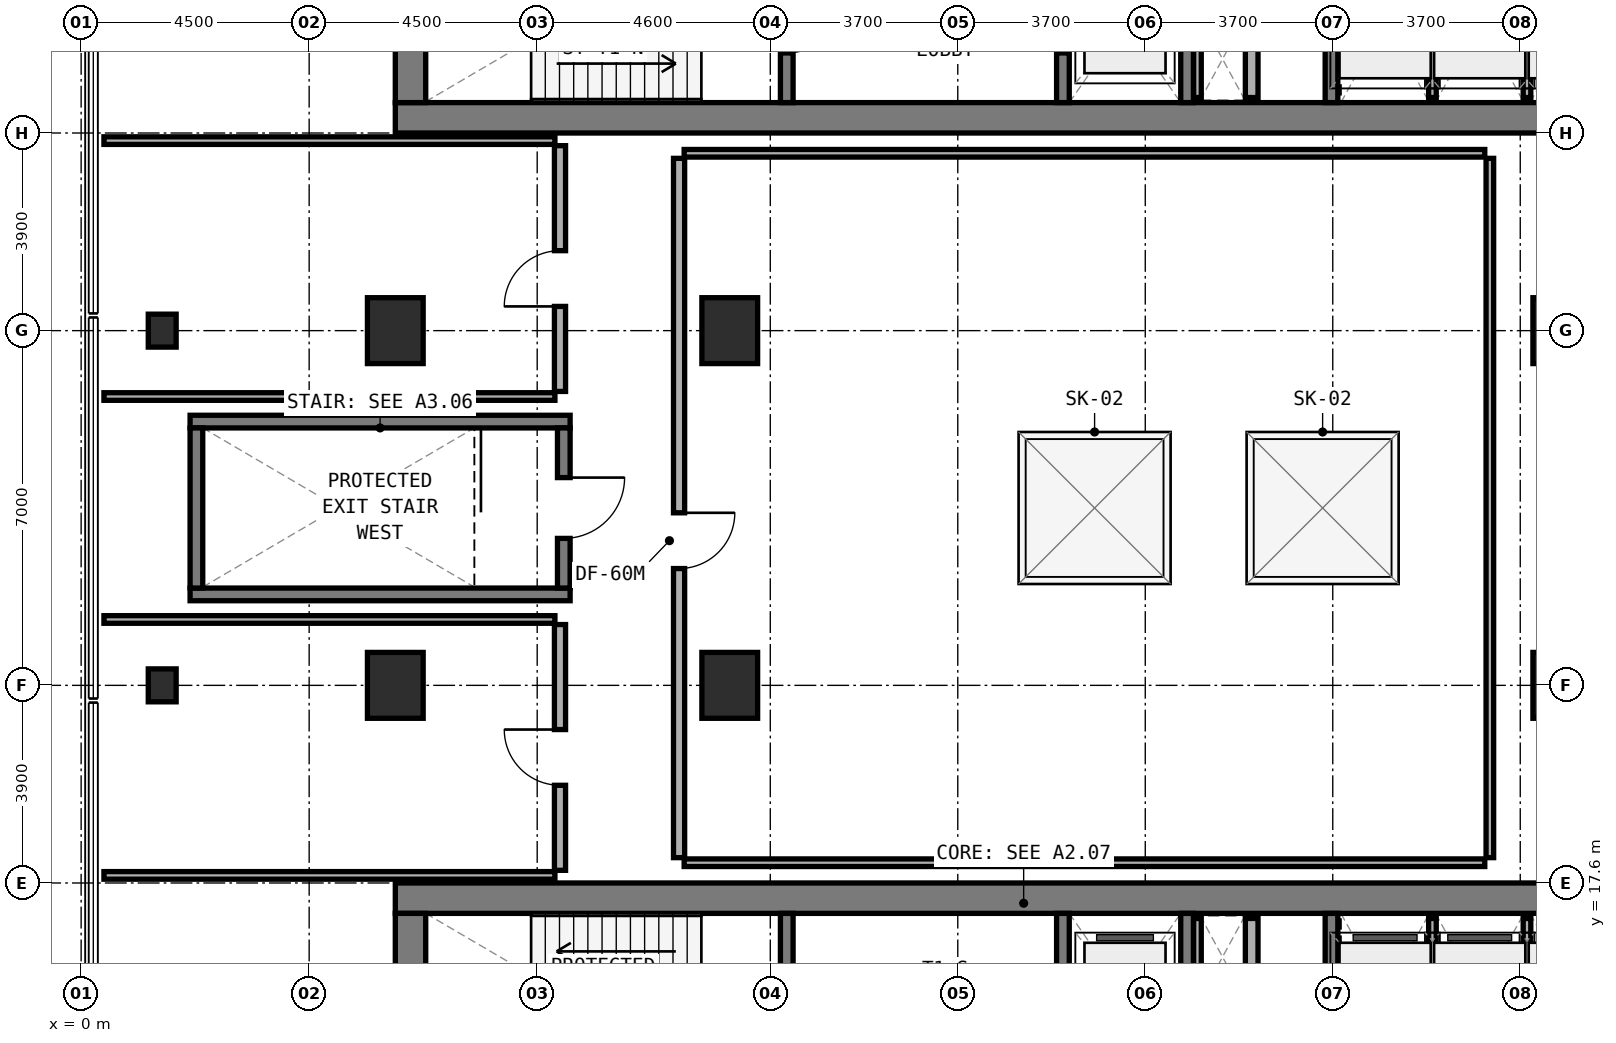
"""IFC4 building model, lengths in metres.
Left out: names, types, materials, properties, quantities, classifications, styles, units other than length and angle.
Written with IfcOpenShell. Run it as: python <this file> out.ifc"""

import sys

from ifc_helpers import new_model, si_unit, direction, frame, frame_2d, origin, origin_2d, place, context, subcontext, project, spatial, rectangle, extrude, element, fill, save


model = new_model("IFC4")
c1 = context("Model", 3, precision=1e-05, world=origin(), true_north=direction((0.0, 1.0)))
c2 = subcontext(c1, "Body", "Model", "MODEL_VIEW")
j1 = project(units=[si_unit("LENGTHUNIT", "METRE"), si_unit("PLANEANGLEUNIT", "RADIAN")], contexts=[c1])
p1 = place(None, origin())
s1 = spatial("IfcSite", under=j1, at=p1, CompositionType="ELEMENT")
p2 = place(p1, origin())
s2 = spatial("IfcBuilding", under=s1, at=p2, CompositionType="ELEMENT")
p3 = place(p2, frame((0.0, 0.0, 19.5)))
s3 = spatial("IfcBuildingStorey", under=s2, at=p3, CompositionType="ELEMENT", Elevation=19.5)
p4 = place(p3, frame((6.2, 32.7, 0.0), z_axis=(0.0, 0.0, 1.0), x_axis=(1.0, 0.0, 0.0)))
e1 = element("IfcWall", 1, at=p4, inside=s3, PredefinedType="SHEAR", context=c2, shape_type="SweptSolid", body=[
    extrude(rectangle(XDim=24.8, YDim=0.6, at=frame_2d((12.4, 0.0))), origin(), (0.0, 0.0, 1.0), 4.5),
])
p5 = place(p3, frame((6.5, 33.0, 0.0), z_axis=(0.0, 0.0, 1.0), x_axis=(0.0, 1.0, 0.0)))
e2 = element("IfcWall", 2, at=p5, inside=s3, PredefinedType="SHEAR", context=c2, shape_type="SweptSolid", body=[
    extrude(rectangle(XDim=3.16, YDim=0.6, at=frame_2d((1.58, 0.0))), origin(), (0.0, 0.0, 1.0), 4.5),
])
p6 = place(p3, frame((13.925, 33.0, 0.0), z_axis=(0.0, 0.0, 1.0), x_axis=(0.0, 1.0, 0.0)))
e3 = element("IfcWall", 3, at=p6, inside=s3, PredefinedType="STANDARD", context=c2, shape_type="SweptSolid", body=[
    extrude(rectangle(XDim=3.16, YDim=0.25, at=frame_2d((1.58, 0.0))), origin(), (0.0, 0.0, 1.0), 4.22),
])
p7 = place(p6, frame((0.98, 0.0, 0.0)))
e4 = element("IfcOpeningElement", 4, at=p7, cuts=e3, PredefinedType="OPENING", context=c2, shape_type="SweptSolid", body=[
    extrude(rectangle(XDim=1.1, YDim=2.15, at=frame_2d((0.55, 1.075))), frame((0.0, 0.135, 0.0), z_axis=(0.0, -1.0, 0.0), x_axis=(1.0, 0.0, 0.0)), (0.0, 0.0, 1.0), 0.27),
])
p8 = place(p3, frame((19.375, 33.0, 0.0), z_axis=(0.0, 0.0, 1.0), x_axis=(0.0, 1.0, 0.0)))
e5 = element("IfcWall", 5, at=p8, inside=s3, PredefinedType="STANDARD", context=c2, shape_type="SweptSolid", body=[
    extrude(rectangle(XDim=3.16, YDim=0.25, at=frame_2d((1.58, 0.0))), origin(), (0.0, 0.0, 1.0), 4.22),
])
p9 = place(p8, frame((0.98, 0.0, 0.0)))
e6 = element("IfcOpeningElement", 6, at=p9, cuts=e5, PredefinedType="OPENING", context=c2, shape_type="SweptSolid", body=[
    extrude(rectangle(XDim=1.1, YDim=2.15, at=frame_2d((0.55, 1.075))), frame((0.0, 0.135, 0.0), z_axis=(0.0, -1.0, 0.0), x_axis=(1.0, 0.0, 0.0)), (0.0, 0.0, 1.0), 0.27),
])
for number, where, z_axis, x_axis in (
    (7, (21.825, 33.0, 0.0), (0.0, 0.0, 1.0), (0.0, 1.0, 0.0)),
    (8, (24.675, 33.0, 0.0), (0.0, 0.0, 1.0), (0.0, 1.0, 0.0)),
):
    element("IfcWall", number, at=place(p3, frame(where, z_axis=z_axis, x_axis=x_axis)), inside=s3, PredefinedType="STANDARD", context=c2, shape_type="SweptSolid", body=[
        extrude(rectangle(XDim=3.16, YDim=0.25, at=frame_2d((1.58, 0.0))), origin(), (0.0, 0.0, 1.0), 4.22),
    ])
p10 = place(p3, frame((6.2, 17.3, 0.0), z_axis=(0.0, 0.0, 1.0), x_axis=(1.0, 0.0, 0.0)))
e9 = element("IfcWall", 9, at=p10, inside=s3, PredefinedType="SHEAR", context=c2, shape_type="SweptSolid", body=[
    extrude(rectangle(XDim=24.8, YDim=0.6, at=frame_2d((12.4, 0.0))), origin(), (0.0, 0.0, 1.0), 4.5),
])
p11 = place(p3, frame((6.5, 13.84, 0.0), z_axis=(0.0, 0.0, 1.0), x_axis=(0.0, 1.0, 0.0)))
e10 = element("IfcWall", 10, at=p11, inside=s3, PredefinedType="SHEAR", context=c2, shape_type="SweptSolid", body=[
    extrude(rectangle(XDim=3.16, YDim=0.6, at=frame_2d((1.58, 0.0))), origin(), (0.0, 0.0, 1.0), 4.5),
])
p12 = place(p3, frame((13.925, 13.84, 0.0), z_axis=(0.0, 0.0, 1.0), x_axis=(0.0, 1.0, 0.0)))
e11 = element("IfcWall", 11, at=p12, inside=s3, PredefinedType="STANDARD", context=c2, shape_type="SweptSolid", body=[
    extrude(rectangle(XDim=3.16, YDim=0.25, at=frame_2d((1.58, 0.0))), origin(), (0.0, 0.0, 1.0), 4.22),
])
p13 = place(p12, frame((0.98, 0.0, 0.0)))
e12 = element("IfcOpeningElement", 12, at=p13, cuts=e11, PredefinedType="OPENING", context=c2, shape_type="SweptSolid", body=[
    extrude(rectangle(XDim=1.1, YDim=2.15, at=frame_2d((0.55, 1.075))), frame((0.0, 0.135, 0.0), z_axis=(0.0, -1.0, 0.0), x_axis=(1.0, 0.0, 0.0)), (0.0, 0.0, 1.0), 0.27),
])
p14 = place(p3, frame((19.375, 13.84, 0.0), z_axis=(0.0, 0.0, 1.0), x_axis=(0.0, 1.0, 0.0)))
e13 = element("IfcWall", 13, at=p14, inside=s3, PredefinedType="STANDARD", context=c2, shape_type="SweptSolid", body=[
    extrude(rectangle(XDim=3.16, YDim=0.25, at=frame_2d((1.58, 0.0))), origin(), (0.0, 0.0, 1.0), 4.22),
])
p15 = place(p14, frame((0.98, 0.0, 0.0)))
e14 = element("IfcOpeningElement", 14, at=p15, cuts=e13, PredefinedType="OPENING", context=c2, shape_type="SweptSolid", body=[
    extrude(rectangle(XDim=1.1, YDim=2.15, at=frame_2d((0.55, 1.075))), frame((0.0, 0.135, 0.0), z_axis=(0.0, -1.0, 0.0), x_axis=(1.0, 0.0, 0.0)), (0.0, 0.0, 1.0), 0.27),
])
for number, where, z_axis, x_axis in (
    (15, (21.825, 13.84, 0.0), (0.0, 0.0, 1.0), (0.0, 1.0, 0.0)),
    (16, (24.675, 13.84, 0.0), (0.0, 0.0, 1.0), (0.0, 1.0, 0.0)),
):
    element("IfcWall", number, at=place(p3, frame(where, z_axis=z_axis, x_axis=x_axis)), inside=s3, PredefinedType="STANDARD", context=c2, shape_type="SweptSolid", body=[
        extrude(rectangle(XDim=3.16, YDim=0.25, at=frame_2d((1.58, 0.0))), origin(), (0.0, 0.0, 1.0), 4.22),
    ])
for number, where, z_axis, x_axis in (
    (17, (2.15, 23.295, 0.0), (0.0, 0.0, 1.0), (1.0, 0.0, 0.0)),
    (18, (2.15, 26.705, 0.0), (0.0, 0.0, 1.0), (1.0, 0.0, 0.0)),
):
    element("IfcWall", number, at=place(p3, frame(where, z_axis=z_axis, x_axis=x_axis)), inside=s3, PredefinedType="STANDARD", context=c2, shape_type="SweptSolid", body=[
        extrude(rectangle(XDim=7.5, YDim=0.25, at=frame_2d((3.75, 0.0))), origin(), (0.0, 0.0, 1.0), 4.5),
    ])
p16 = place(p3, frame((2.275, 23.42, 0.0), z_axis=(0.0, 0.0, 1.0), x_axis=(0.0, 1.0, 0.0)))
e19 = element("IfcWall", 19, at=p16, inside=s3, PredefinedType="STANDARD", context=c2, shape_type="SweptSolid", body=[
    extrude(rectangle(XDim=3.16, YDim=0.25, at=frame_2d((1.58, 0.0))), origin(), (0.0, 0.0, 1.0), 4.5),
])
p17 = place(p3, frame((9.525, 23.42, 0.0), z_axis=(0.0, 0.0, 1.0), x_axis=(0.0, 1.0, 0.0)))
e20 = element("IfcWall", 20, at=p17, inside=s3, PredefinedType="STANDARD", context=c2, shape_type="SweptSolid", body=[
    extrude(rectangle(XDim=3.16, YDim=0.25, at=frame_2d((1.58, 0.0))), origin(), (0.0, 0.0, 1.0), 4.5),
])
p18 = place(p17, frame((0.98, 0.0, 0.0)))
e21 = element("IfcOpeningElement", 21, at=p18, cuts=e20, PredefinedType="OPENING", context=c2, shape_type="SweptSolid", body=[
    extrude(rectangle(XDim=1.2, YDim=2.15, at=frame_2d((0.6, 1.075))), frame((0.0, 0.135, 0.0), z_axis=(0.0, -1.0, 0.0), x_axis=(1.0, 0.0, 0.0)), (0.0, 0.0, 1.0), 0.27),
])
for number, where, z_axis, x_axis in (
    (22, (6.2, 21.5, 0.0), (0.0, 0.0, 1.0), (1.0, 0.0, 0.0)),
    (23, (6.2, 28.5, 0.0), (0.0, 0.0, 1.0), (1.0, 0.0, 0.0)),
    (24, (12.8, 21.5, 0.0), (0.0, 0.0, 1.0), (1.0, 0.0, 0.0)),
    (25, (12.8, 28.5, 0.0), (0.0, 0.0, 1.0), (1.0, 0.0, 0.0)),
    (26, (29.2, 21.5, 0.0), (0.0, 0.0, 1.0), (1.0, 0.0, 0.0)),
    (27, (29.2, 28.5, 0.0), (0.0, 0.0, 1.0), (1.0, 0.0, 0.0)),
):
    element("IfcColumn", number, at=place(p3, frame(where, z_axis=z_axis, x_axis=x_axis)), inside=s3, PredefinedType="COLUMN", context=c2, shape_type="SweptSolid", body=[
        extrude(rectangle(XDim=1.1, YDim=1.3, at=origin_2d()), origin(), (0.0, 0.0, 1.0), 4.5),
    ])
for number, where, z_axis, x_axis in (
    (28, (1.6, 21.5, 0.0), (0.0, 0.0, 1.0), (1.0, 0.0, 0.0)),
    (29, (1.6, 28.5, 0.0), (0.0, 0.0, 1.0), (1.0, 0.0, 0.0)),
):
    element("IfcColumn", number, at=place(p3, frame(where, z_axis=z_axis, x_axis=x_axis)), inside=s3, PredefinedType="PILASTER", context=c2, shape_type="SweptSolid", body=[
        extrude(rectangle(XDim=0.55, YDim=0.65, at=origin_2d()), origin(), (0.0, 0.0, 1.0), 4.5),
    ])
p19 = place(p3, frame((22.03, 33.1, 0.0), z_axis=(0.0, 0.0, 1.0), x_axis=(0.0, 1.0, 0.0)))
e30 = element("IfcWall", 30, at=p19, inside=s3, PredefinedType="PARTITIONING", context=c2, shape_type="SweptSolid", body=[
    extrude(rectangle(XDim=1.62, YDim=0.15, at=frame_2d((0.81, 0.0))), origin(), (0.0, 0.0, 1.0), 4.22),
])
p20 = place(p3, frame((23.1, 33.1, 0.0), z_axis=(0.0, 0.0, 1.0), x_axis=(0.0, 1.0, 0.0)))
e31 = element("IfcWall", 31, at=p20, inside=s3, PredefinedType="SOLIDWALL", context=c2, shape_type="SweptSolid", body=[
    extrude(rectangle(XDim=1.62, YDim=0.25, at=frame_2d((0.81, 0.0))), origin(), (0.0, 0.0, 1.0), 4.22),
])
p21 = place(p3, frame((26.667, 33.1, 0.0), z_axis=(0.0, 0.0, 1.0), x_axis=(0.0, 1.0, 0.0)))
e32 = element("IfcWall", 32, at=p21, inside=s3, PredefinedType="PARTITIONING", context=c2, shape_type="SweptSolid", body=[
    extrude(rectangle(XDim=2.96, YDim=0.15, at=frame_2d((1.48, 0.0))), origin(), (0.0, 0.0, 1.0), 4.22),
])
p22 = place(p3, frame((28.533, 33.1, 0.0), z_axis=(0.0, 0.0, 1.0), x_axis=(0.0, 1.0, 0.0)))
e33 = element("IfcWall", 33, at=p22, inside=s3, PredefinedType="PARTITIONING", context=c2, shape_type="SweptSolid", body=[
    extrude(rectangle(XDim=2.96, YDim=0.15, at=frame_2d((1.48, 0.0))), origin(), (0.0, 0.0, 1.0), 3.295),
])
p23 = place(p3, frame((22.03, 15.28, 0.0), z_axis=(0.0, 0.0, 1.0), x_axis=(0.0, 1.0, 0.0)))
e34 = element("IfcWall", 34, at=p23, inside=s3, PredefinedType="PARTITIONING", context=c2, shape_type="SweptSolid", body=[
    extrude(rectangle(XDim=1.62, YDim=0.15, at=frame_2d((0.81, 0.0))), origin(), (0.0, 0.0, 1.0), 4.22),
])
p24 = place(p3, frame((23.1, 15.28, 0.0), z_axis=(0.0, 0.0, 1.0), x_axis=(0.0, 1.0, 0.0)))
e35 = element("IfcWall", 35, at=p24, inside=s3, PredefinedType="SOLIDWALL", context=c2, shape_type="SweptSolid", body=[
    extrude(rectangle(XDim=1.62, YDim=0.25, at=frame_2d((0.81, 0.0))), origin(), (0.0, 0.0, 1.0), 4.22),
])
p25 = place(p3, frame((26.667, 13.94, 0.0), z_axis=(0.0, 0.0, 1.0), x_axis=(0.0, 1.0, 0.0)))
e36 = element("IfcWall", 36, at=p25, inside=s3, PredefinedType="PARTITIONING", context=c2, shape_type="SweptSolid", body=[
    extrude(rectangle(XDim=2.96, YDim=0.15, at=frame_2d((1.48, 0.0))), origin(), (0.0, 0.0, 1.0), 4.22),
])
p26 = place(p3, frame((28.533, 13.94, 0.0), z_axis=(0.0, 0.0, 1.0), x_axis=(0.0, 1.0, 0.0)))
e37 = element("IfcWall", 37, at=p26, inside=s3, PredefinedType="PARTITIONING", context=c2, shape_type="SweptSolid", body=[
    extrude(rectangle(XDim=2.96, YDim=0.15, at=frame_2d((1.48, 0.0))), origin(), (0.0, 0.0, 1.0), 3.295),
])
p27 = place(p3, frame((27.8, 18.1, 0.0), z_axis=(0.0, 0.0, 1.0), x_axis=(0.0, 1.0, 0.0)))
e38 = element("IfcWall", 38, at=p27, inside=s3, PredefinedType="PARTITIONING", context=c2, shape_type="SweptSolid", body=[
    extrude(rectangle(XDim=13.8, YDim=0.15, at=frame_2d((6.9, 0.0))), origin(), (0.0, 0.0, 1.0), 4.22),
])
for number, where, z_axis, x_axis in (
    (39, (11.9, 18.0, 0.0), (0.0, 0.0, 1.0), (1.0, 0.0, 0.0)),
    (40, (11.9, 32.0, 0.0), (0.0, 0.0, 1.0), (1.0, 0.0, 0.0)),
):
    element("IfcWall", number, at=place(p3, frame(where, z_axis=z_axis, x_axis=x_axis)), inside=s3, PredefinedType="PARTITIONING", context=c2, shape_type="SweptSolid", body=[
        extrude(rectangle(XDim=15.8, YDim=0.15, at=frame_2d((7.9, 0.0))), origin(), (0.0, 0.0, 1.0), 4.22),
    ])
p28 = place(p3, frame((11.8, 18.1, 0.0), z_axis=(0.0, 0.0, 1.0), x_axis=(0.0, 1.0, 0.0)))
e41 = element("IfcWall", 41, at=p28, inside=s3, PredefinedType="SOLIDWALL", context=c2, shape_type="SweptSolid", body=[
    extrude(rectangle(XDim=13.8, YDim=0.22, at=frame_2d((6.9, 0.0))), origin(), (0.0, 0.0, 1.0), 3.295),
])
p29 = place(p28, frame((5.705, 0.0, 0.0)))
e42 = element("IfcOpeningElement", 42, at=p29, cuts=e41, PredefinedType="OPENING", context=c2, shape_type="SweptSolid", body=[
    extrude(rectangle(XDim=1.1, YDim=2.1, at=frame_2d((0.55, 1.05))), frame((0.0, 0.12, 0.0), z_axis=(0.0, -1.0, 0.0), x_axis=(1.0, 0.0, 0.0)), (0.0, 0.0, 1.0), 0.24),
])
for number, where, z_axis, x_axis in (
    (43, (0.45, 17.75, 0.0), (0.0, 0.0, 1.0), (1.0, 0.0, 0.0)),
    (44, (0.45, 22.8, 0.0), (0.0, 0.0, 1.0), (1.0, 0.0, 0.0)),
):
    element("IfcWall", number, at=place(p3, frame(where, z_axis=z_axis, x_axis=x_axis)), inside=s3, PredefinedType="PARTITIONING", context=c2, shape_type="SweptSolid", body=[
        extrude(rectangle(XDim=8.9, YDim=0.15, at=frame_2d((4.45, 0.0))), origin(), (0.0, 0.0, 1.0), 4.22),
    ])
p30 = place(p3, frame((9.45, 17.85, 0.0), z_axis=(0.0, 0.0, 1.0), x_axis=(0.0, 1.0, 0.0)))
e45 = element("IfcWall", 45, at=p30, inside=s3, PredefinedType="SOLIDWALL", context=c2, shape_type="SweptSolid", body=[
    extrude(rectangle(XDim=4.85, YDim=0.22, at=frame_2d((2.425, 0.0))), origin(), (0.0, 0.0, 1.0), 3.295),
])
p31 = place(p30, frame((1.678, 0.0, 0.0)))
e46 = element("IfcOpeningElement", 46, at=p31, cuts=e45, PredefinedType="OPENING", context=c2, shape_type="SweptSolid", body=[
    extrude(rectangle(XDim=1.1, YDim=2.1, at=frame_2d((0.55, 1.05))), frame((0.0, 0.12, 0.0), z_axis=(0.0, -1.0, 0.0), x_axis=(1.0, 0.0, 0.0)), (0.0, 0.0, 1.0), 0.24),
])
for number, where, z_axis, x_axis in (
    (47, (0.45, 27.2, 0.0), (0.0, 0.0, 1.0), (1.0, 0.0, 0.0)),
    (48, (0.45, 32.25, 0.0), (0.0, 0.0, 1.0), (1.0, 0.0, 0.0)),
):
    element("IfcWall", number, at=place(p3, frame(where, z_axis=z_axis, x_axis=x_axis)), inside=s3, PredefinedType="PARTITIONING", context=c2, shape_type="SweptSolid", body=[
        extrude(rectangle(XDim=8.9, YDim=0.15, at=frame_2d((4.45, 0.0))), origin(), (0.0, 0.0, 1.0), 4.22),
    ])
p32 = place(p3, frame((9.45, 27.3, 0.0), z_axis=(0.0, 0.0, 1.0), x_axis=(0.0, 1.0, 0.0)))
e49 = element("IfcWall", 49, at=p32, inside=s3, PredefinedType="SOLIDWALL", context=c2, shape_type="SweptSolid", body=[
    extrude(rectangle(XDim=4.85, YDim=0.22, at=frame_2d((2.425, 0.0))), origin(), (0.0, 0.0, 1.0), 3.295),
])
p33 = place(p32, frame((1.678, 0.0, 0.0)))
e50 = element("IfcOpeningElement", 50, at=p33, cuts=e49, PredefinedType="OPENING", context=c2, shape_type="SweptSolid", body=[
    extrude(rectangle(XDim=1.1, YDim=2.1, at=frame_2d((0.55, 1.05))), frame((0.0, 0.12, 0.0), z_axis=(0.0, -1.0, 0.0), x_axis=(1.0, 0.0, 0.0)), (0.0, 0.0, 1.0), 0.24),
])
p34 = place(p3, frame((0.0, 0.0, -0.4)))
p35 = place(p34, frame((20.0, 25.0, 0.0)))
p36 = place(p35, frame((0.0, 0.0, 0.35)))
e51 = element("IfcWindow", 51, at=p36, inside=s3, PartitioningType="SINGLE_PANEL", PredefinedType="SKYLIGHT", context=c2, shape_type="SweptSolid", body=[
    extrude(rectangle(XDim=3.0, YDim=3.0, at=origin_2d()), origin(), (0.0, 0.0, 1.0), 0.05),
])
p37 = place(p34, frame((24.5, 25.0, 0.0)))
p38 = place(p37, frame((0.0, 0.0, 0.35)))
e52 = element("IfcWindow", 52, at=p38, inside=s3, PartitioningType="SINGLE_PANEL", PredefinedType="SKYLIGHT", context=c2, shape_type="SweptSolid", body=[
    extrude(rectangle(XDim=3.0, YDim=3.0, at=origin_2d()), origin(), (0.0, 0.0, 1.0), 0.05),
])
p39 = place(p7, frame((1.1, 0.0, 0.0), z_axis=(0.0, 0.0, 1.0), x_axis=(-1.0, 0.0, 0.0)))
e53 = element("IfcDoor", 53, at=p39, inside=s3, OperationType="SINGLE_SWING_LEFT", PredefinedType="DOOR", context=c2, shape_type="SweptSolid", body=[
    extrude(rectangle(XDim=1.1, YDim=2.15, at=frame_2d((0.55, 1.075))), frame((0.0, 0.025, 0.0), z_axis=(0.0, -1.0, 0.0), x_axis=(1.0, 0.0, 0.0)), (0.0, 0.0, 1.0), 0.05),
])
fill(e4, e53)
p40 = place(p9, origin())
e54 = element("IfcDoor", 54, at=p40, inside=s3, OperationType="DOUBLE_DOOR_SLIDING", PredefinedType="DOOR", context=c2, shape_type="SweptSolid", body=[
    extrude(rectangle(XDim=1.1, YDim=2.15, at=frame_2d((0.55, 1.075))), frame((0.0, 0.025, 0.0), z_axis=(0.0, -1.0, 0.0), x_axis=(1.0, 0.0, 0.0)), (0.0, 0.0, 1.0), 0.05),
])
fill(e6, e54)
p41 = place(p18, frame((1.2, 0.0, 0.0), z_axis=(0.0, 0.0, 1.0), x_axis=(-1.0, 0.0, 0.0)))
e55 = element("IfcDoor", 55, at=p41, inside=s3, OperationType="SINGLE_SWING_LEFT", PredefinedType="DOOR", context=c2, shape_type="SweptSolid", body=[
    extrude(rectangle(XDim=1.2, YDim=2.15, at=frame_2d((0.6, 1.075))), frame((0.0, 0.025, 0.0), z_axis=(0.0, -1.0, 0.0), x_axis=(1.0, 0.0, 0.0)), (0.0, 0.0, 1.0), 0.05),
])
fill(e21, e55)
p42 = place(p29, frame((1.1, 0.0, 0.0), z_axis=(0.0, 0.0, 1.0), x_axis=(-1.0, 0.0, 0.0)))
e56 = element("IfcDoor", 56, at=p42, inside=s3, OperationType="SINGLE_SWING_LEFT", PredefinedType="DOOR", context=c2, shape_type="SweptSolid", body=[
    extrude(rectangle(XDim=1.1, YDim=2.1, at=frame_2d((0.55, 1.05))), frame((0.0, 0.025, 0.0), z_axis=(0.0, -1.0, 0.0), x_axis=(1.0, 0.0, 0.0)), (0.0, 0.0, 1.0), 0.05),
])
fill(e42, e56)
p43 = place(p31, origin())
e57 = element("IfcDoor", 57, at=p43, inside=s3, OperationType="SINGLE_SWING_RIGHT", PredefinedType="DOOR", context=c2, shape_type="SweptSolid", body=[
    extrude(rectangle(XDim=1.1, YDim=2.1, at=frame_2d((0.55, 1.05))), frame((0.0, 0.025, 0.0), z_axis=(0.0, -1.0, 0.0), x_axis=(1.0, 0.0, 0.0)), (0.0, 0.0, 1.0), 0.05),
])
fill(e46, e57)
p44 = place(p33, origin())
e58 = element("IfcDoor", 58, at=p44, inside=s3, OperationType="SINGLE_SWING_LEFT", PredefinedType="DOOR", context=c2, shape_type="SweptSolid", body=[
    extrude(rectangle(XDim=1.1, YDim=2.1, at=frame_2d((0.55, 1.05))), frame((0.0, 0.025, 0.0), z_axis=(0.0, -1.0, 0.0), x_axis=(1.0, 0.0, 0.0)), (0.0, 0.0, 1.0), 0.05),
])
fill(e50, e58)
save(model, sys.argv[1])
